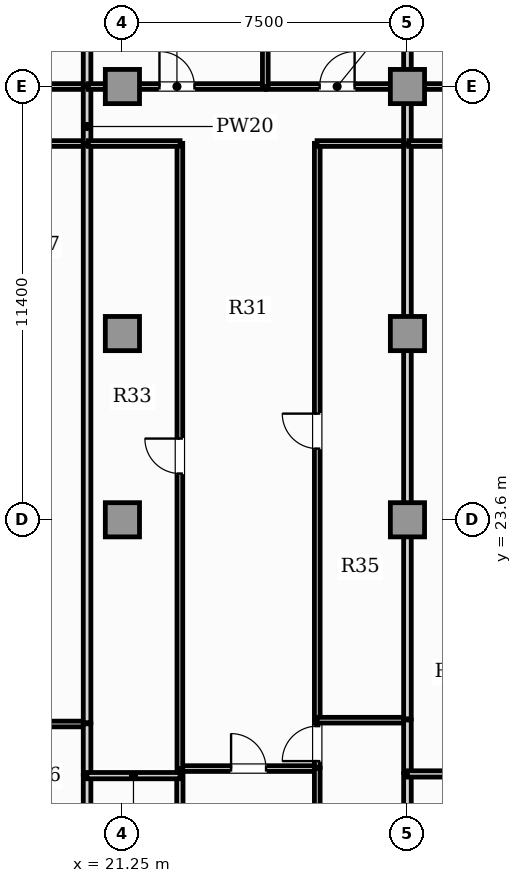
"""IFC4 building model, lengths in metres.
Left out: names, types, materials, properties, quantities, classifications, styles, units other than length and angle.
Written with IfcOpenShell. Run it as: python <this file> out.ifc"""

import sys

from ifc_helpers import new_model, si_unit, direction, frame, frame_2d, origin, origin_2d, place, context, subcontext, project, spatial, rectangle, extrude, element, fill, save


model = new_model("IFC4")
c1 = context("Model", 3, precision=1e-05, world=origin(), true_north=direction((0.0, 1.0)))
c2 = subcontext(c1, "Body", "Model", "MODEL_VIEW")
j1 = project(units=[si_unit("LENGTHUNIT", "METRE"), si_unit("PLANEANGLEUNIT", "RADIAN")], contexts=[c1])
p1 = place(None, origin())
s1 = spatial("IfcSite", under=j1, at=p1, CompositionType="ELEMENT")
p2 = place(p1, origin())
s2 = spatial("IfcBuilding", under=s1, at=p2, CompositionType="ELEMENT")
p3 = place(p2, frame((0.0, 0.0, 92.6)))
s3 = spatial("IfcBuildingStorey", under=s2, at=p3, CompositionType="ELEMENT", Elevation=92.6)
for number, where, z_axis, x_axis in (
    (1, (21.25, 23.6, 0.0), (0.0, 0.0, 1.0), (1.0, 0.0, 0.0)),
    (2, (28.75, 23.6, 0.0), (0.0, 0.0, 1.0), (1.0, 0.0, 0.0)),
    (3, (21.25, 28.5, 0.0), (0.0, 0.0, 1.0), (1.0, 0.0, 0.0)),
    (4, (28.75, 28.5, 0.0), (0.0, 0.0, 1.0), (1.0, 0.0, 0.0)),
    (5, (21.25, 35.0, 0.0), (0.0, 0.0, 1.0), (1.0, 0.0, 0.0)),
    (6, (28.75, 35.0, 0.0), (0.0, 0.0, 1.0), (1.0, 0.0, 0.0)),
):
    element("IfcColumn", number, at=place(p3, frame(where, z_axis=z_axis, x_axis=x_axis)), inside=s3, PredefinedType="COLUMN", context=c2, shape_type="SweptSolid", body=[
        extrude(rectangle(XDim=0.9, YDim=0.9, at=origin_2d()), origin(), (0.0, 0.0, 1.0), 3.85),
    ])
p4 = place(p3, frame((17.89, 33.5, 0.0), z_axis=(0.0, 0.0, 1.0), x_axis=(1.0, 0.0, 0.0)))
e7 = element("IfcWall", 7, at=p4, inside=s3, PredefinedType="PARTITIONING", context=c2, shape_type="SweptSolid", body=[
    extrude(rectangle(XDim=2.435, YDim=0.15, at=frame_2d((1.217, 0.0))), origin(), (0.0, 0.0, 1.0), 3.6),
])
p5 = place(p3, frame((16.615, 35.0, 0.0), z_axis=(0.0, 0.0, 1.0), x_axis=(1.0, 0.0, 0.0)))
e8 = element("IfcWall", 8, at=p5, inside=s3, PredefinedType="PARTITIONING", context=c2, shape_type="SweptSolid", body=[
    extrude(rectangle(XDim=3.71, YDim=0.15, at=frame_2d((1.855, 0.0))), origin(), (0.0, 0.0, 1.0), 2.983),
])
p6 = place(p5, frame((1.395, 0.0, 0.0)))
e9 = element("IfcOpeningElement", 9, at=p6, cuts=e8, PredefinedType="OPENING", context=c2, shape_type="SweptSolid", body=[
    extrude(rectangle(XDim=0.92, YDim=2.1, at=frame_2d((0.46, 1.05))), frame((0.0, 0.085, 0.0), z_axis=(0.0, -1.0, 0.0), x_axis=(1.0, 0.0, 0.0)), (0.0, 0.0, 1.0), 0.17),
])
p7 = place(p3, frame((20.32, 33.495, 0.0), z_axis=(0.0, 0.0, 1.0), x_axis=(0.0, 1.0, 0.0)))
e10 = element("IfcWall", 10, at=p7, inside=s3, PredefinedType="PARTITIONING", context=c2, shape_type="SweptSolid", body=[
    extrude(rectangle(XDim=1.51, YDim=0.2, at=frame_2d((0.755, 0.0))), origin(), (0.0, 0.0, 1.0), 3.6),
])
p8 = place(p3, frame((17.89, 18.227, 0.0), z_axis=(0.0, 0.0, 1.0), x_axis=(1.0, 0.0, 0.0)))
e11 = element("IfcWall", 11, at=p8, inside=s3, PredefinedType="PARTITIONING", context=c2, shape_type="SweptSolid", body=[
    extrude(rectangle(XDim=2.435, YDim=0.15, at=frame_2d((1.217, 0.0))), origin(), (0.0, 0.0, 1.0), 3.6),
])
p9 = place(p3, frame((20.32, 13.765, 0.0), z_axis=(0.0, 0.0, 1.0), x_axis=(0.0, 1.0, 0.0)))
e12 = element("IfcWall", 12, at=p9, inside=s3, PredefinedType="PARTITIONING", context=c2, shape_type="SweptSolid", body=[
    extrude(rectangle(XDim=3.108, YDim=0.2, at=frame_2d((1.554, 0.0))), origin(), (0.0, 0.0, 1.0), 3.6),
])
p10 = place(p3, frame((20.32, 16.903, 0.0), z_axis=(0.0, 0.0, 1.0), x_axis=(0.0, 1.0, 0.0)))
e13 = element("IfcWall", 13, at=p10, inside=s3, PredefinedType="PARTITIONING", context=c2, shape_type="SweptSolid", body=[
    extrude(rectangle(XDim=1.329, YDim=0.2, at=frame_2d((0.664, 0.0))), origin(), (0.0, 0.0, 1.0), 3.6),
])
p11 = place(p3, frame((20.32, 18.262, 0.0), z_axis=(0.0, 0.0, 1.0), x_axis=(0.0, 1.0, 0.0)))
e14 = element("IfcWall", 14, at=p11, inside=s3, PredefinedType="PARTITIONING", context=c2, shape_type="SweptSolid", body=[
    extrude(rectangle(XDim=15.203, YDim=0.2, at=frame_2d((7.602, 0.0))), origin(), (0.0, 0.0, 1.0), 3.6),
])
p12 = place(p3, frame((20.32, 35.035, 0.0), z_axis=(0.0, 0.0, 1.0), x_axis=(0.0, 1.0, 0.0)))
e15 = element("IfcWall", 15, at=p12, inside=s3, PredefinedType="PARTITIONING", context=c2, shape_type="SweptSolid", body=[
    extrude(rectangle(XDim=7.955, YDim=0.2, at=frame_2d((3.978, 0.0))), origin(), (0.0, 0.0, 1.0), 3.6),
])
p13 = place(p3, frame((22.757, 17.054, 0.0), z_axis=(0.0, 0.0, 1.0), x_axis=(1.0, 0.0, 0.0)))
e16 = element("IfcWall", 16, at=p13, inside=s3, PredefinedType="PARTITIONING", context=c2, shape_type="SweptSolid", body=[
    extrude(rectangle(XDim=3.625, YDim=0.15, at=frame_2d((1.812, 0.0))), origin(), (0.0, 0.0, 1.0), 3.6),
])
p14 = place(p13, frame((1.353, 0.0, 0.0)))
e17 = element("IfcOpeningElement", 17, at=p14, cuts=e16, PredefinedType="OPENING", context=c2, shape_type="SweptSolid", body=[
    extrude(rectangle(XDim=0.92, YDim=2.1, at=frame_2d((0.46, 1.05))), frame((0.0, 0.085, 0.0), z_axis=(0.0, -1.0, 0.0), x_axis=(1.0, 0.0, 0.0)), (0.0, 0.0, 1.0), 0.17),
])
p15 = place(p3, frame((22.762, 13.765, 0.0), z_axis=(0.0, 0.0, 1.0), x_axis=(0.0, 1.0, 0.0)))
e18 = element("IfcWall", 18, at=p15, inside=s3, PredefinedType="PLUMBINGWALL", context=c2, shape_type="SweptSolid", body=[
    extrude(rectangle(XDim=3.108, YDim=0.165, at=frame_2d((1.554, 0.0))), origin(), (0.0, 0.0, 1.0), 3.6),
])
p16 = place(p15, frame((1.129, 0.0, 0.0)))
e19 = element("IfcOpeningElement", 19, at=p16, cuts=e18, PredefinedType="OPENING", context=c2, shape_type="SweptSolid", body=[
    extrude(rectangle(XDim=0.85, YDim=2.1, at=frame_2d((0.425, 1.05))), frame((0.0, 0.093, 0.0), z_axis=(0.0, -1.0, 0.0), x_axis=(1.0, 0.0, 0.0)), (0.0, 0.0, 1.0), 0.185),
])
p17 = place(p3, frame((26.377, 13.765, 0.0), z_axis=(0.0, 0.0, 1.0), x_axis=(0.0, 1.0, 0.0)))
e20 = element("IfcWall", 20, at=p17, inside=s3, PredefinedType="PARTITIONING", context=c2, shape_type="SweptSolid", body=[
    extrude(rectangle(XDim=3.294, YDim=0.15, at=frame_2d((1.647, 0.0))), origin(), (0.0, 0.0, 1.0), 3.6),
])
p18 = place(p17, frame((1.187, 0.0, 0.0)))
e21 = element("IfcOpeningElement", 21, at=p18, cuts=e20, PredefinedType="OPENING", context=c2, shape_type="SweptSolid", body=[
    extrude(rectangle(XDim=0.92, YDim=2.1, at=frame_2d((0.46, 1.05))), frame((0.0, 0.085, 0.0), z_axis=(0.0, -1.0, 0.0), x_axis=(1.0, 0.0, 0.0)), (0.0, 0.0, 1.0), 0.17),
])
p19 = place(p3, frame((22.762, 17.049, 0.0), z_axis=(0.0, 0.0, 1.0), x_axis=(0.0, 1.0, 0.0)))
e22 = element("IfcWall", 22, at=p19, inside=s3, PredefinedType="PARTITIONING", context=c2, shape_type="SweptSolid", body=[
    extrude(rectangle(XDim=16.456, YDim=0.15, at=frame_2d((8.228, 0.0))), origin(), (0.0, 0.0, 1.0), 3.6),
])
p20 = place(p19, frame((7.768, 0.0, 0.0)))
e23 = element("IfcOpeningElement", 23, at=p20, cuts=e22, PredefinedType="OPENING", context=c2, shape_type="SweptSolid", body=[
    extrude(rectangle(XDim=0.92, YDim=2.1, at=frame_2d((0.46, 1.05))), frame((0.0, 0.085, 0.0), z_axis=(0.0, -1.0, 0.0), x_axis=(1.0, 0.0, 0.0)), (0.0, 0.0, 1.0), 0.17),
])
p21 = place(p3, frame((20.355, 33.5, 0.0), z_axis=(0.0, 0.0, 1.0), x_axis=(1.0, 0.0, 0.0)))
e24 = element("IfcWall", 24, at=p21, inside=s3, PredefinedType="PARTITIONING", context=c2, shape_type="SweptSolid", body=[
    extrude(rectangle(XDim=2.412, YDim=0.15, at=frame_2d((1.206, 0.0))), origin(), (0.0, 0.0, 1.0), 3.6),
])
p22 = place(p3, frame((26.377, 17.089, 0.0), z_axis=(0.0, 0.0, 1.0), x_axis=(0.0, 1.0, 0.0)))
e25 = element("IfcWall", 25, at=p22, inside=s3, PredefinedType="PARTITIONING", context=c2, shape_type="SweptSolid", body=[
    extrude(rectangle(XDim=1.243, YDim=0.15, at=frame_2d((0.622, 0.0))), origin(), (0.0, 0.0, 1.0), 3.6),
])
p23 = place(p22, frame((0.162, 0.0, 0.0)))
e26 = element("IfcOpeningElement", 26, at=p23, cuts=e25, PredefinedType="OPENING", context=c2, shape_type="SweptSolid", body=[
    extrude(rectangle(XDim=0.92, YDim=2.1, at=frame_2d((0.46, 1.05))), frame((0.0, 0.085, 0.0), z_axis=(0.0, -1.0, 0.0), x_axis=(1.0, 0.0, 0.0)), (0.0, 0.0, 1.0), 0.17),
])
p24 = place(p3, frame((26.377, 18.362, 0.0), z_axis=(0.0, 0.0, 1.0), x_axis=(0.0, 1.0, 0.0)))
e27 = element("IfcWall", 27, at=p24, inside=s3, PredefinedType="PARTITIONING", context=c2, shape_type="SweptSolid", body=[
    extrude(rectangle(XDim=15.143, YDim=0.15, at=frame_2d((7.571, 0.0))), origin(), (0.0, 0.0, 1.0), 3.6),
])
p25 = place(p24, frame((7.111, 0.0, 0.0)))
e28 = element("IfcOpeningElement", 28, at=p25, cuts=e27, PredefinedType="OPENING", context=c2, shape_type="SweptSolid", body=[
    extrude(rectangle(XDim=0.92, YDim=2.1, at=frame_2d((0.46, 1.05))), frame((0.0, 0.085, 0.0), z_axis=(0.0, -1.0, 0.0), x_axis=(1.0, 0.0, 0.0)), (0.0, 0.0, 1.0), 0.17),
])
p26 = place(p3, frame((26.372, 33.5, 0.0), z_axis=(0.0, 0.0, 1.0), x_axis=(1.0, 0.0, 0.0)))
e29 = element("IfcWall", 29, at=p26, inside=s3, PredefinedType="PARTITIONING", context=c2, shape_type="SweptSolid", body=[
    extrude(rectangle(XDim=2.383, YDim=0.15, at=frame_2d((1.191, 0.0))), origin(), (0.0, 0.0, 1.0), 3.6),
])
p27 = place(p3, frame((20.355, 35.0, 0.0), z_axis=(0.0, 0.0, 1.0), x_axis=(1.0, 0.0, 0.0)))
e30 = element("IfcWall", 30, at=p27, inside=s3, PredefinedType="PARTITIONING", context=c2, shape_type="SweptSolid", body=[
    extrude(rectangle(XDim=4.66, YDim=0.15, at=frame_2d((2.33, 0.0))), origin(), (0.0, 0.0, 1.0), 2.983),
])
p28 = place(p27, frame((1.87, 0.0, 0.0)))
e31 = element("IfcOpeningElement", 31, at=p28, cuts=e30, PredefinedType="OPENING", context=c2, shape_type="SweptSolid", body=[
    extrude(rectangle(XDim=0.92, YDim=2.1, at=frame_2d((0.46, 1.05))), frame((0.0, 0.085, 0.0), z_axis=(0.0, -1.0, 0.0), x_axis=(1.0, 0.0, 0.0)), (0.0, 0.0, 1.0), 0.17),
])
p29 = place(p3, frame((25.045, 35.0, 0.0), z_axis=(0.0, 0.0, 1.0), x_axis=(1.0, 0.0, 0.0)))
e32 = element("IfcWall", 32, at=p29, inside=s3, PredefinedType="PARTITIONING", context=c2, shape_type="SweptSolid", body=[
    extrude(rectangle(XDim=3.71, YDim=0.15, at=frame_2d((1.855, 0.0))), origin(), (0.0, 0.0, 1.0), 2.983),
])
p30 = place(p29, frame((1.395, 0.0, 0.0)))
e33 = element("IfcOpeningElement", 33, at=p30, cuts=e32, PredefinedType="OPENING", context=c2, shape_type="SweptSolid", body=[
    extrude(rectangle(XDim=0.92, YDim=2.1, at=frame_2d((0.46, 1.05))), frame((0.0, 0.085, 0.0), z_axis=(0.0, -1.0, 0.0), x_axis=(1.0, 0.0, 0.0)), (0.0, 0.0, 1.0), 0.17),
])
p31 = place(p3, frame((28.75, 33.495, 0.0), z_axis=(0.0, 0.0, 1.0), x_axis=(0.0, 1.0, 0.0)))
e34 = element("IfcWall", 34, at=p31, inside=s3, PredefinedType="PARTITIONING", context=c2, shape_type="SweptSolid", body=[
    extrude(rectangle(XDim=1.51, YDim=0.2, at=frame_2d((0.755, 0.0))), origin(), (0.0, 0.0, 1.0), 3.146),
])
p32 = place(p3, frame((20.315, 16.868, 0.0), z_axis=(0.0, 0.0, 1.0), x_axis=(1.0, 0.0, 0.0)))
e35 = element("IfcWall", 35, at=p32, inside=s3, PredefinedType="PLUMBINGWALL", context=c2, shape_type="SweptSolid", body=[
    extrude(rectangle(XDim=2.452, YDim=0.165, at=frame_2d((1.226, 0.0))), origin(), (0.0, 0.0, 1.0), 3.6),
])
p33 = place(p3, frame((26.372, 18.327, 0.0), z_axis=(0.0, 0.0, 1.0), x_axis=(1.0, 0.0, 0.0)))
e36 = element("IfcWall", 36, at=p33, inside=s3, PredefinedType="PARTITIONING", context=c2, shape_type="SweptSolid", body=[
    extrude(rectangle(XDim=2.383, YDim=0.15, at=frame_2d((1.191, 0.0))), origin(), (0.0, 0.0, 1.0), 3.6),
])
p34 = place(p3, frame((28.75, 13.765, 0.0), z_axis=(0.0, 0.0, 1.0), x_axis=(0.0, 1.0, 0.0)))
e37 = element("IfcWall", 37, at=p34, inside=s3, PredefinedType="PARTITIONING", context=c2, shape_type="SweptSolid", body=[
    extrude(rectangle(XDim=3.153, YDim=0.2, at=frame_2d((1.577, 0.0))), origin(), (0.0, 0.0, 1.0), 3.146),
])
p35 = place(p3, frame((28.75, 16.948, 0.0), z_axis=(0.0, 0.0, 1.0), x_axis=(0.0, 1.0, 0.0)))
e38 = element("IfcWall", 38, at=p35, inside=s3, PredefinedType="PARTITIONING", context=c2, shape_type="SweptSolid", body=[
    extrude(rectangle(XDim=1.384, YDim=0.2, at=frame_2d((0.692, 0.0))), origin(), (0.0, 0.0, 1.0), 3.146),
])
p36 = place(p3, frame((28.75, 18.362, 0.0), z_axis=(0.0, 0.0, 1.0), x_axis=(0.0, 1.0, 0.0)))
e39 = element("IfcWall", 39, at=p36, inside=s3, PredefinedType="PARTITIONING", context=c2, shape_type="SweptSolid", body=[
    extrude(rectangle(XDim=15.103, YDim=0.2, at=frame_2d((7.551, 0.0))), origin(), (0.0, 0.0, 1.0), 3.146),
])
p37 = place(p3, frame((25.01, 34.995, 0.0), z_axis=(0.0, 0.0, 1.0), x_axis=(0.0, 1.0, 0.0)))
e40 = element("IfcWall", 40, at=p37, inside=s3, PredefinedType="PARTITIONING", context=c2, shape_type="SweptSolid", body=[
    extrude(rectangle(XDim=7.995, YDim=0.15, at=frame_2d((3.998, 0.0))), origin(), (0.0, 0.0, 1.0), 3.6),
])
p38 = place(p3, frame((28.75, 35.035, 0.0), z_axis=(0.0, 0.0, 1.0), x_axis=(0.0, 1.0, 0.0)))
e41 = element("IfcWall", 41, at=p38, inside=s3, PredefinedType="PARTITIONING", context=c2, shape_type="SweptSolid", body=[
    extrude(rectangle(XDim=7.955, YDim=0.2, at=frame_2d((3.978, 0.0))), origin(), (0.0, 0.0, 1.0), 3.6),
])
p39 = place(p3, frame((28.785, 33.5, 0.0), z_axis=(0.0, 0.0, 1.0), x_axis=(1.0, 0.0, 0.0)))
e42 = element("IfcWall", 42, at=p39, inside=s3, PredefinedType="PARTITIONING", context=c2, shape_type="SweptSolid", body=[
    extrude(rectangle(XDim=2.378, YDim=0.15, at=frame_2d((1.189, 0.0))), origin(), (0.0, 0.0, 1.0), 3.6),
])
p40 = place(p3, frame((28.785, 35.0, 0.0), z_axis=(0.0, 0.0, 1.0), x_axis=(1.0, 0.0, 0.0)))
e43 = element("IfcWall", 43, at=p40, inside=s3, PredefinedType="PARTITIONING", context=c2, shape_type="SweptSolid", body=[
    extrude(rectangle(XDim=4.66, YDim=0.15, at=frame_2d((2.33, 0.0))), origin(), (0.0, 0.0, 1.0), 2.983),
])
p41 = place(p40, frame((1.87, 0.0, 0.0)))
e44 = element("IfcOpeningElement", 44, at=p41, cuts=e43, PredefinedType="OPENING", context=c2, shape_type="SweptSolid", body=[
    extrude(rectangle(XDim=0.92, YDim=2.1, at=frame_2d((0.46, 1.05))), frame((0.0, 0.085, 0.0), z_axis=(0.0, -1.0, 0.0), x_axis=(1.0, 0.0, 0.0)), (0.0, 0.0, 1.0), 0.17),
])
p42 = place(p3, frame((28.745, 16.913, 0.0), z_axis=(0.0, 0.0, 1.0), x_axis=(1.0, 0.0, 0.0)))
e45 = element("IfcWall", 45, at=p42, inside=s3, PredefinedType="PLUMBINGWALL", context=c2, shape_type="SweptSolid", body=[
    extrude(rectangle(XDim=2.417, YDim=0.165, at=frame_2d((1.209, 0.0))), origin(), (0.0, 0.0, 1.0), 3.6),
])
p43 = place(p14, origin())
e46 = element("IfcDoor", 46, at=p43, inside=s3, OperationType="SINGLE_SWING_LEFT", PredefinedType="DOOR", context=c2, shape_type="SweptSolid", body=[
    extrude(rectangle(XDim=0.92, YDim=2.1, at=frame_2d((0.46, 1.05))), frame((0.0, 0.025, 0.0), z_axis=(0.0, -1.0, 0.0), x_axis=(1.0, 0.0, 0.0)), (0.0, 0.0, 1.0), 0.05),
])
fill(e17, e46)
p44 = place(p20, origin())
e47 = element("IfcDoor", 47, at=p44, inside=s3, OperationType="SINGLE_SWING_RIGHT", PredefinedType="DOOR", context=c2, shape_type="SweptSolid", body=[
    extrude(rectangle(XDim=0.92, YDim=2.1, at=frame_2d((0.46, 1.05))), frame((0.0, 0.025, 0.0), z_axis=(0.0, -1.0, 0.0), x_axis=(1.0, 0.0, 0.0)), (0.0, 0.0, 1.0), 0.05),
])
fill(e23, e47)
p45 = place(p23, origin())
e48 = element("IfcDoor", 48, at=p45, inside=s3, OperationType="SINGLE_SWING_LEFT", PredefinedType="DOOR", context=c2, shape_type="SweptSolid", body=[
    extrude(rectangle(XDim=0.92, YDim=2.1, at=frame_2d((0.46, 1.05))), frame((0.0, 0.025, 0.0), z_axis=(0.0, -1.0, 0.0), x_axis=(1.0, 0.0, 0.0)), (0.0, 0.0, 1.0), 0.05),
])
fill(e26, e48)
p46 = place(p25, origin())
e49 = element("IfcDoor", 49, at=p46, inside=s3, OperationType="SINGLE_SWING_RIGHT", PredefinedType="DOOR", context=c2, shape_type="SweptSolid", body=[
    extrude(rectangle(XDim=0.92, YDim=2.1, at=frame_2d((0.46, 1.05))), frame((0.0, 0.025, 0.0), z_axis=(0.0, -1.0, 0.0), x_axis=(1.0, 0.0, 0.0)), (0.0, 0.0, 1.0), 0.05),
])
fill(e28, e49)
p47 = place(p28, origin())
e50 = element("IfcDoor", 50, at=p47, inside=s3, OperationType="SINGLE_SWING_LEFT", PredefinedType="DOOR", context=c2, shape_type="SweptSolid", body=[
    extrude(rectangle(XDim=0.92, YDim=2.1, at=frame_2d((0.46, 1.05))), frame((0.0, 0.025, 0.0), z_axis=(0.0, -1.0, 0.0), x_axis=(1.0, 0.0, 0.0)), (0.0, 0.0, 1.0), 0.05),
])
fill(e31, e50)
p48 = place(p30, origin())
e51 = element("IfcDoor", 51, at=p48, inside=s3, OperationType="SINGLE_SWING_RIGHT", PredefinedType="DOOR", context=c2, shape_type="SweptSolid", body=[
    extrude(rectangle(XDim=0.92, YDim=2.1, at=frame_2d((0.46, 1.05))), frame((0.0, 0.025, 0.0), z_axis=(0.0, -1.0, 0.0), x_axis=(1.0, 0.0, 0.0)), (0.0, 0.0, 1.0), 0.05),
])
fill(e33, e51)
save(model, sys.argv[1])
